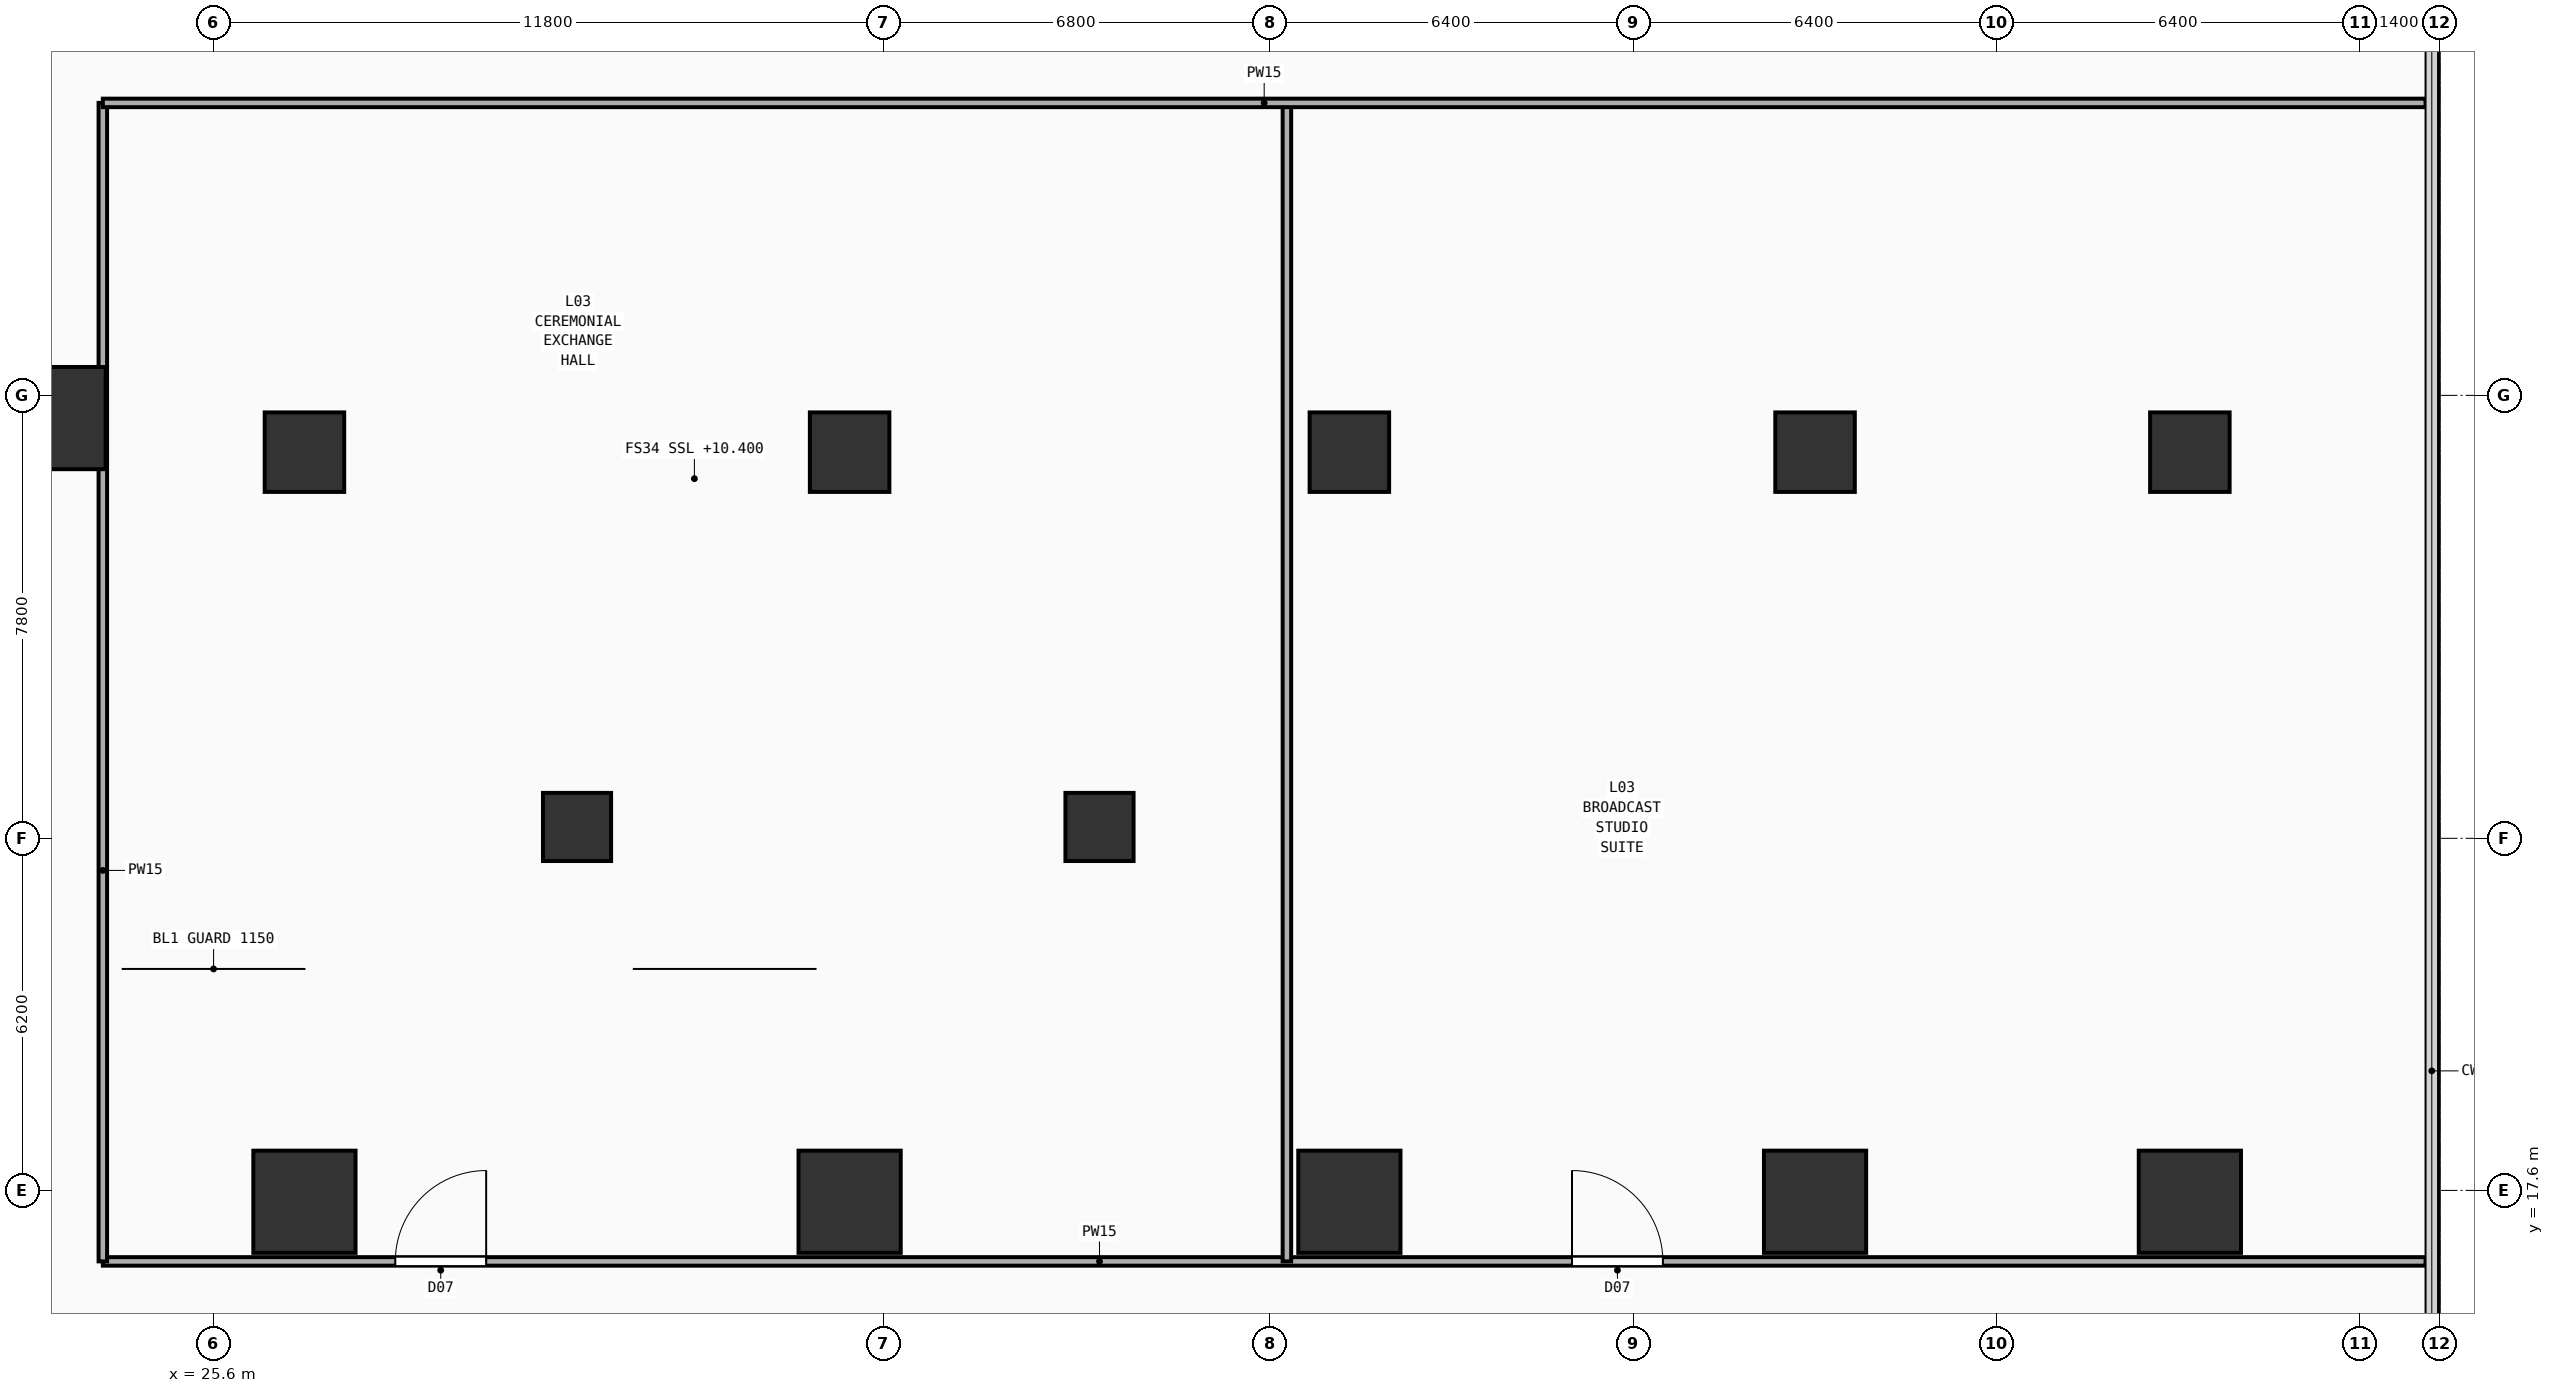
"""IFC4 building model, lengths in metres.
Left out: names, types, materials, properties, quantities, classifications, styles, units other than length and angle.
Written with IfcOpenShell. Run it as: python <this file> out.ifc"""

import sys

from ifc_helpers import new_model, si_unit, direction, frame, frame_2d, origin, origin_2d, place, context, subcontext, project, spatial, rectangle, circle, extrude, element, fill, save


model = new_model("IFC4")
c1 = context("Model", 3, precision=1e-05, world=origin(), true_north=direction((0.0, 1.0)))
c2 = subcontext(c1, "Body", "Model", "MODEL_VIEW")
j1 = project(units=[si_unit("LENGTHUNIT", "METRE"), si_unit("PLANEANGLEUNIT", "RADIAN")], contexts=[c1])
p1 = place(None, origin())
s1 = spatial("IfcSite", under=j1, at=p1, CompositionType="ELEMENT")
p2 = place(p1, origin())
s2 = spatial("IfcBuilding", under=s1, at=p2, CompositionType="ELEMENT")
p3 = place(p2, frame((0.0, 0.0, 10.4)))
s3 = spatial("IfcBuildingStorey", under=s2, at=p3, CompositionType="ELEMENT", Elevation=10.4)
for number, where, z_axis, x_axis in (
    (1, (27.2, 17.4, 0.0), (0.0, 0.0, 1.0), (1.0, 0.0, 0.0)),
    (2, (36.8, 17.4, 0.0), (0.0, 0.0, 1.0), (1.0, 0.0, 0.0)),
    (3, (45.6, 17.4, 0.0), (0.0, 0.0, 1.0), (1.0, 0.0, 0.0)),
    (4, (53.8, 17.4, 0.0), (0.0, 0.0, 1.0), (1.0, 0.0, 0.0)),
    (5, (60.4, 17.4, 0.0), (0.0, 0.0, 1.0), (1.0, 0.0, 0.0)),
    (6, (22.8, 31.2, 0.0), (0.0, 0.0, 1.0), (1.0, 0.0, 0.0)),
):
    element("IfcColumn", number, at=place(p3, frame(where, z_axis=z_axis, x_axis=x_axis)), inside=s3, PredefinedType="COLUMN", context=c2, shape_type="SweptSolid", body=[
        extrude(rectangle(XDim=1.8, YDim=1.8, at=origin_2d()), origin(), (0.0, 0.0, 1.0), 4.46),
    ])
for number, where, z_axis, x_axis in (
    (7, (27.2, 30.6, 0.0), (0.0, 0.0, 1.0), (1.0, 0.0, 0.0)),
    (8, (36.8, 30.6, 0.0), (0.0, 0.0, 1.0), (1.0, 0.0, 0.0)),
    (9, (45.6, 30.6, 0.0), (0.0, 0.0, 1.0), (1.0, 0.0, 0.0)),
    (10, (53.8, 30.6, 0.0), (0.0, 0.0, 1.0), (1.0, 0.0, 0.0)),
    (11, (60.4, 30.6, 0.0), (0.0, 0.0, 1.0), (1.0, 0.0, 0.0)),
):
    element("IfcColumn", number, at=place(p3, frame(where, z_axis=z_axis, x_axis=x_axis)), inside=s3, PredefinedType="COLUMN", context=c2, shape_type="SweptSolid", body=[
        extrude(rectangle(XDim=1.4, YDim=1.4, at=origin_2d()), origin(), (0.0, 0.0, 1.0), 4.46),
    ])
for number, where, z_axis, x_axis in (
    (12, (32.0, 24.0, 0.0), (0.0, 0.0, 1.0), (1.0, 0.0, 0.0)),
    (13, (41.2, 24.0, 0.0), (0.0, 0.0, 1.0), (1.0, 0.0, 0.0)),
):
    element("IfcColumn", number, at=place(p3, frame(where, z_axis=z_axis, x_axis=x_axis)), inside=s3, PredefinedType="COLUMN", context=c2, shape_type="SweptSolid", body=[
        extrude(circle(Radius=0.6, at=origin_2d()), origin(), (0.0, 0.0, 1.0), 4.46),
    ])
p4 = place(p3, frame((23.65, 16.35, 0.0), z_axis=(0.0, 0.0, 1.0), x_axis=(1.0, 0.0, 0.0)))
e14 = element("IfcWall", 14, at=p4, inside=s3, PredefinedType="PARTITIONING", context=c2, shape_type="SweptSolid", body=[
    extrude(rectangle(XDim=40.9, YDim=0.15, at=frame_2d((20.45, 0.0))), origin(), (0.0, 0.0, 1.0), 4.46),
])
p5 = place(p4, frame((5.15, 0.0, 0.0)))
e15 = element("IfcOpeningElement", 15, at=p5, cuts=e14, PredefinedType="OPENING", context=c2, shape_type="SweptSolid", body=[
    extrude(rectangle(XDim=1.6, YDim=2.4, at=frame_2d((0.8, 1.2))), frame((0.0, 0.085, 0.0), z_axis=(0.0, -1.0, 0.0), x_axis=(1.0, 0.0, 0.0)), (0.0, 0.0, 1.0), 0.17),
])
p6 = place(p4, frame((25.87, 0.0, 0.0)))
e16 = element("IfcOpeningElement", 16, at=p6, cuts=e14, PredefinedType="OPENING", context=c2, shape_type="SweptSolid", body=[
    extrude(rectangle(XDim=1.6, YDim=2.4, at=frame_2d((0.8, 1.2))), frame((0.0, 0.085, 0.0), z_axis=(0.0, -1.0, 0.0), x_axis=(1.0, 0.0, 0.0)), (0.0, 0.0, 1.0), 0.17),
])
for number, where, z_axis, x_axis in (
    (17, (23.65, 16.35, 0.0), (0.0, 0.0, 1.0), (0.0, 1.0, 0.0)),
    (18, (44.5, 16.35, 0.0), (0.0, 0.0, 1.0), (0.0, 1.0, 0.0)),
):
    element("IfcWall", number, at=place(p3, frame(where, z_axis=z_axis, x_axis=x_axis)), inside=s3, PredefinedType="PARTITIONING", context=c2, shape_type="SweptSolid", body=[
        extrude(rectangle(XDim=20.4, YDim=0.15, at=frame_2d((10.2, 0.0))), origin(), (0.0, 0.0, 1.0), 4.46),
    ])
p7 = place(p3, frame((23.65, 36.75, 0.0), z_axis=(0.0, 0.0, 1.0), x_axis=(1.0, 0.0, 0.0)))
e19 = element("IfcWall", 19, at=p7, inside=s3, PredefinedType="PARTITIONING", context=c2, shape_type="SweptSolid", body=[
    extrude(rectangle(XDim=40.9, YDim=0.15, at=frame_2d((20.45, 0.0))), origin(), (0.0, 0.0, 1.0), 4.46),
])
p8 = place(p5, origin())
e20 = element("IfcDoor", 20, at=p8, inside=s3, OperationType="SINGLE_SWING_RIGHT", PredefinedType="DOOR", context=c2, shape_type="SweptSolid", body=[
    extrude(rectangle(XDim=1.6, YDim=2.4, at=frame_2d((0.8, 1.2))), frame((0.0, 0.025, 0.0), z_axis=(0.0, -1.0, 0.0), x_axis=(1.0, 0.0, 0.0)), (0.0, 0.0, 1.0), 0.05),
])
fill(e15, e20)
p9 = place(p6, origin())
e21 = element("IfcDoor", 21, at=p9, inside=s3, OperationType="SINGLE_SWING_LEFT", PredefinedType="DOOR", context=c2, shape_type="SweptSolid", body=[
    extrude(rectangle(XDim=1.6, YDim=2.4, at=frame_2d((0.8, 1.2))), frame((0.0, 0.025, 0.0), z_axis=(0.0, -1.0, 0.0), x_axis=(1.0, 0.0, 0.0)), (0.0, 0.0, 1.0), 0.05),
])
fill(e16, e21)
save(model, sys.argv[1])
